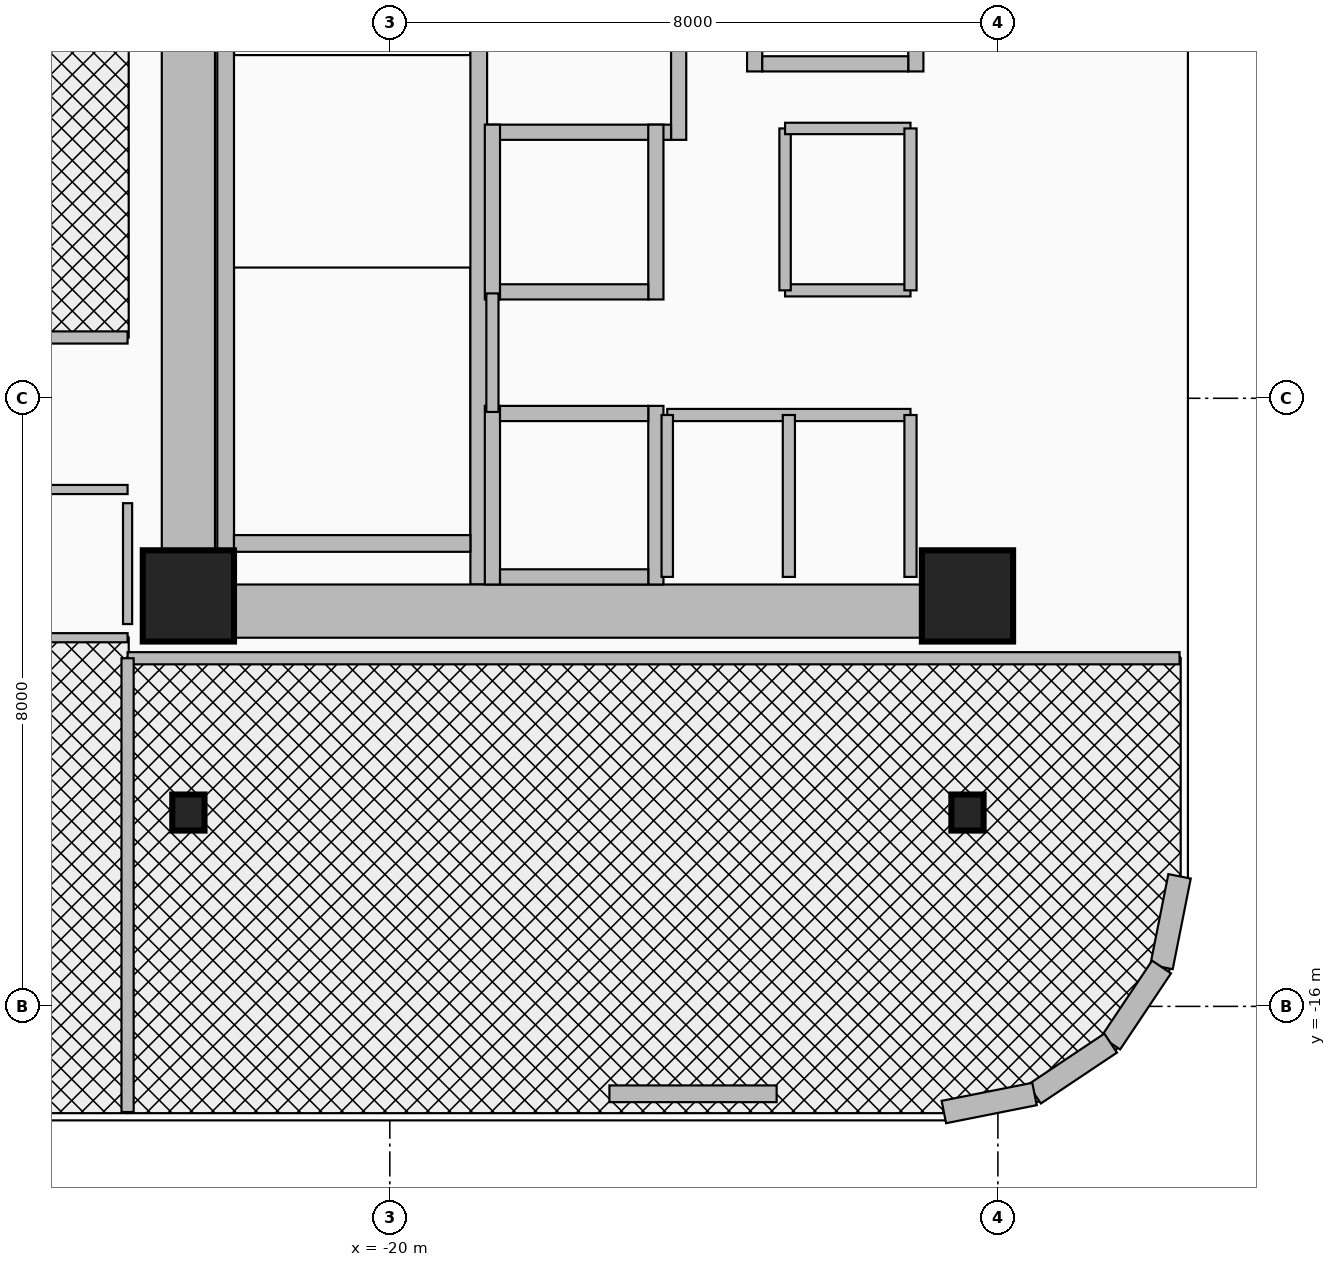
"""IFC4 building model, lengths in metres.
Left out: names, types, materials, properties, quantities, classifications, styles, units other than length and angle.
Written with IfcOpenShell. Run it as: python <this file> out.ifc"""

import sys

from ifc_helpers import new_model, si_unit, direction, frame, frame_2d, origin, origin_2d, place, context, subcontext, project, spatial, rectangle, i_section, extrude, source, transform, mapped, element, fill, save


model = new_model("IFC4")
c1 = context("Model", 3, precision=1e-05, world=origin(), true_north=direction((0.0, 1.0)))
c2 = subcontext(c1, "Body", "Model", "MODEL_VIEW")
j1 = project(units=[si_unit("LENGTHUNIT", "METRE"), si_unit("PLANEANGLEUNIT", "RADIAN")], contexts=[c1])
p1 = place(None, origin())
s1 = spatial("IfcSite", under=j1, at=p1, CompositionType="ELEMENT")
p2 = place(p1, origin())
s2 = spatial("IfcBuilding", under=s1, at=p2, CompositionType="ELEMENT")
p3 = place(p2, frame((0.0, 0.0, 109.4)))
s3 = spatial("IfcBuildingStorey", under=s2, at=p3, CompositionType="ELEMENT", Elevation=109.4)
for number, where, z_axis, x_axis in (
    (1, (-22.16, -10.45, 0.0), (0.0, 0.0, 1.0), (0.0, 1.0, 0.0)),
    (2, (-18.83, -10.45, 0.0), (0.0, 0.0, 1.0), (0.0, 1.0, 0.0)),
):
    element("IfcWall", number, at=place(p3, frame(where, z_axis=z_axis, x_axis=x_axis)), inside=s3, PredefinedType="SHEAR", context=c2, shape_type="SweptSolid", body=[
        extrude(rectangle(XDim=8.67, YDim=0.22, at=frame_2d((4.335, 0.0))), origin(), (0.0, 0.0, 1.0), 3.46),
    ])
p4 = place(p3, frame((-22.05, -9.91, 0.0), z_axis=(0.0, 0.0, 1.0), x_axis=(1.0, 0.0, 0.0)))
e3 = element("IfcWall", 3, at=p4, inside=s3, PredefinedType="SHEAR", context=c2, shape_type="SweptSolid", body=[
    extrude(rectangle(XDim=3.11, YDim=0.22, at=frame_2d((1.555, 0.0))), origin(), (0.0, 0.0, 1.0), 3.46),
])
p5 = place(p3, frame((-22.65, -11.15, 0.0), z_axis=(0.0, 0.0, 1.0), x_axis=(0.0, 1.0, 0.0)))
e4 = element("IfcWall", 4, at=p5, inside=s3, PredefinedType="SHEAR", context=c2, shape_type="SweptSolid", body=[
    extrude(rectangle(XDim=22.3, YDim=0.7, at=frame_2d((11.15, 0.0))), origin(), (0.0, 0.0, 1.0), 3.46),
])
p6 = place(p3, frame((-22.65, -10.8, 0.0), z_axis=(0.0, 0.0, 1.0), x_axis=(1.0, 0.0, 0.0)))
e5 = element("IfcWall", 5, at=p6, inside=s3, PredefinedType="SHEAR", context=c2, shape_type="SweptSolid", body=[
    extrude(rectangle(XDim=10.25, YDim=0.7, at=frame_2d((5.125, 0.0))), origin(), (0.0, 0.0, 1.0), 3.46),
])
m1 = source(origin(), c2, "Body", "SweptSolid", [
    extrude(rectangle(XDim=1.2, YDim=1.2, at=origin_2d()), origin(), (0.0, 0.0, 1.0), 3.7),
])
for number, where, z_axis, x_axis in (
    (6, (-22.65, -10.6, 0.0), (0.0, 0.0, 1.0), (1.0, 0.0, 0.0)),
    (7, (-12.4, -10.6, 0.0), (0.0, 0.0, 1.0), (1.0, 0.0, 0.0)),
):
    element("IfcColumn", number, at=place(p3, frame(where, z_axis=z_axis, x_axis=x_axis)), inside=s3, PredefinedType="COLUMN", context=c2, shape_type="MappedRepresentation", body=[
        mapped(m1, transform((0.0, 0.0, 0.0), x_axis=(1.0, 0.0, 0.0), y_axis=(0.0, 1.0, 0.0), z_axis=(0.0, 0.0, 1.0), scale=1.0)),
    ])
m2 = source(origin(), c2, "Body", "SweptSolid", [
    extrude(i_section(OverallWidth=0.424, OverallDepth=0.474, WebThickness=0.048, FlangeThickness=0.077, at=origin_2d()), origin(), (0.0, 0.0, 1.0), 3.7),
])
for number, where, z_axis, x_axis in (
    (8, (-22.65, -13.45, 0.0), (0.0, 0.0, 1.0), (1.0, 0.0, 0.0)),
    (9, (-12.4, -13.45, 0.0), (0.0, 0.0, 1.0), (1.0, 0.0, 0.0)),
):
    element("IfcColumn", number, at=place(p3, frame(where, z_axis=z_axis, x_axis=x_axis)), inside=s3, PredefinedType="COLUMN", context=c2, shape_type="MappedRepresentation", body=[
        mapped(m2, transform((0.0, 0.0, 0.0), x_axis=(1.0, 0.0, 0.0), y_axis=(0.0, 1.0, 0.0), z_axis=(0.0, 0.0, 1.0), scale=1.0)),
    ])
p7 = place(p3, frame((-9.61, -14.289, 0.0), z_axis=(0.0, 0.0, 1.0), x_axis=(-0.194996050505, -0.980804027463, 0.0)))
e10 = element("IfcWall", 10, at=p7, inside=s3, PredefinedType="SOLIDWALL", context=c2, shape_type="SweptSolid", body=[
    extrude(rectangle(XDim=1.216, YDim=0.3, at=frame_2d((0.608, 0.0))), origin(), (0.0, 0.0, 1.0), 3.46),
])
for number, where, z_axis, x_axis in (
    (11, (-9.847, -15.482, 0.0), (0.0, 0.0, 1.0), (-0.556, -0.831, 0.0)),
    (12, (-10.517, -16.483, 0.0), (0.0, 0.0, 1.0), (-0.831, -0.556, 0.0)),
):
    element("IfcWall", number, at=place(p3, frame(where, z_axis=z_axis, x_axis=x_axis)), inside=s3, PredefinedType="SOLIDWALL", context=c2, shape_type="SweptSolid", body=[
        extrude(rectangle(XDim=1.205, YDim=0.3, at=frame_2d((0.603, 0.0))), origin(), (0.0, 0.0, 1.0), 3.46),
    ])
p8 = place(p3, frame((-11.518, -17.153, 0.0), z_axis=(0.0, 0.0, 1.0), x_axis=(-0.980804027463, -0.194996050505, 0.0)))
e13 = element("IfcWall", 13, at=p8, inside=s3, PredefinedType="SOLIDWALL", context=c2, shape_type="SweptSolid", body=[
    extrude(rectangle(XDim=1.216, YDim=0.3, at=frame_2d((0.608, 0.0))), origin(), (0.0, 0.0, 1.0), 3.46),
])
p9 = place(p3, frame((-14.911, -17.15, 0.0), z_axis=(0.0, 0.0, 1.0), x_axis=(-1.0, 0.0, 0.0)))
e14 = element("IfcWall", 14, at=p9, inside=s3, PredefinedType="SOLIDWALL", context=c2, shape_type="SweptSolid", body=[
    extrude(rectangle(XDim=2.2, YDim=0.22, at=frame_2d((1.1, 0.0))), origin(), (0.0, 0.0, 1.0), 3.46),
])
p10 = place(p9, frame((0.65, 0.0, 0.95)))
e15 = element("IfcOpeningElement", 15, at=p10, cuts=e14, PredefinedType="OPENING", context=c2, shape_type="SweptSolid", body=[
    extrude(rectangle(XDim=0.9, YDim=1.3, at=frame_2d((0.45, 0.65))), frame((0.0, 0.125, 0.0), z_axis=(0.0, -1.0, 0.0), x_axis=(1.0, 0.0, 0.0)), (0.0, 0.0, 1.0), 0.25),
])
p11 = place(p3, frame((-16.2, -4.6, 0.0), z_axis=(0.0, 0.0, 1.0), x_axis=(0.0, 1.0, 0.0)))
e16 = element("IfcWall", 16, at=p11, inside=s3, PredefinedType="MOVABLE", context=c2, shape_type="SweptSolid", body=[
    extrude(rectangle(XDim=3.2, YDim=0.2, at=frame_2d((1.6, 0.0))), origin(), (0.0, 0.0, 1.0), 3.46),
])
p12 = place(p3, frame((-18.72, -4.5, 0.0), z_axis=(0.0, 0.0, 1.0), x_axis=(1.0, 0.0, 0.0)))
e17 = element("IfcWall", 17, at=p12, inside=s3, PredefinedType="MOVABLE", context=c2, shape_type="SweptSolid", body=[
    extrude(rectangle(XDim=2.42, YDim=0.2, at=frame_2d((1.21, 0.0))), origin(), (0.0, 0.0, 1.0), 3.46),
])
for number, where, z_axis, x_axis in (
    (18, (-18.65, -10.45, 0.0), (0.0, 0.0, 1.0), (0.0, 1.0, 0.0)),
    (19, (-16.5, -10.45, 0.0), (0.0, 0.0, 1.0), (0.0, 1.0, 0.0)),
):
    element("IfcWall", number, at=place(p3, frame(where, z_axis=z_axis, x_axis=x_axis)), inside=s3, PredefinedType="MOVABLE", context=c2, shape_type="SweptSolid", body=[
        extrude(rectangle(XDim=2.35, YDim=0.2, at=frame_2d((1.175, 0.0))), origin(), (0.0, 0.0, 1.0), 2.666),
    ])
p13 = place(p3, frame((-18.55, -10.35, 0.0), z_axis=(0.0, 0.0, 1.0), x_axis=(1.0, 0.0, 0.0)))
e20 = element("IfcWall", 20, at=p13, inside=s3, PredefinedType="MOVABLE", context=c2, shape_type="SweptSolid", body=[
    extrude(rectangle(XDim=1.95, YDim=0.2, at=frame_2d((0.975, 0.0))), origin(), (0.0, 0.0, 1.0), 2.666),
])
p14 = place(p3, frame((-18.55, -8.2, 0.0), z_axis=(0.0, 0.0, 1.0), x_axis=(1.0, 0.0, 0.0)))
e21 = element("IfcWall", 21, at=p14, inside=s3, PredefinedType="MOVABLE", context=c2, shape_type="SweptSolid", body=[
    extrude(rectangle(XDim=1.95, YDim=0.2, at=frame_2d((0.975, 0.0))), origin(), (0.0, 0.0, 1.0), 3.46),
])
p15 = place(p14, frame((0.425, 0.0, 0.0)))
e22 = element("IfcOpeningElement", 22, at=p15, cuts=e21, PredefinedType="OPENING", context=c2, shape_type="SweptSolid", body=[
    extrude(rectangle(XDim=1.1, YDim=2.1, at=frame_2d((0.55, 1.05))), frame((0.0, 0.115, 0.0), z_axis=(0.0, -1.0, 0.0), x_axis=(1.0, 0.0, 0.0)), (0.0, 0.0, 1.0), 0.23),
])
for number, where, z_axis, x_axis in (
    (23, (-18.65, -6.7, 0.0), (0.0, 0.0, 1.0), (0.0, 1.0, 0.0)),
    (24, (-16.5, -6.7, 0.0), (0.0, 0.0, 1.0), (0.0, 1.0, 0.0)),
):
    element("IfcWall", number, at=place(p3, frame(where, z_axis=z_axis, x_axis=x_axis)), inside=s3, PredefinedType="MOVABLE", context=c2, shape_type="SweptSolid", body=[
        extrude(rectangle(XDim=2.3, YDim=0.2, at=frame_2d((1.15, 0.0))), origin(), (0.0, 0.0, 1.0), 3.46),
    ])
p16 = place(p3, frame((-18.55, -6.6, 0.0), z_axis=(0.0, 0.0, 1.0), x_axis=(1.0, 0.0, 0.0)))
e25 = element("IfcWall", 25, at=p16, inside=s3, PredefinedType="MOVABLE", context=c2, shape_type="SweptSolid", body=[
    extrude(rectangle(XDim=1.95, YDim=0.2, at=frame_2d((0.975, 0.0))), origin(), (0.0, 0.0, 1.0), 3.46),
])
for number, where, z_axis, x_axis in (
    (26, (-15.2, -3.7, 0.0), (0.0, 0.0, 1.0), (0.0, 1.0, 0.0)),
    (27, (-13.08, -3.7, 0.0), (0.0, 0.0, 1.0), (0.0, 1.0, 0.0)),
):
    element("IfcWall", number, at=place(p3, frame(where, z_axis=z_axis, x_axis=x_axis)), inside=s3, PredefinedType="MOVABLE", context=c2, shape_type="SweptSolid", body=[
        extrude(rectangle(XDim=2.35, YDim=0.2, at=frame_2d((1.175, 0.0))), origin(), (0.0, 0.0, 1.0), 3.46),
    ])
p17 = place(p3, frame((-15.1, -3.6, 0.0), z_axis=(0.0, 0.0, 1.0), x_axis=(1.0, 0.0, 0.0)))
e28 = element("IfcWall", 28, at=p17, inside=s3, PredefinedType="MOVABLE", context=c2, shape_type="SweptSolid", body=[
    extrude(rectangle(XDim=1.92, YDim=0.2, at=frame_2d((0.96, 0.0))), origin(), (0.0, 0.0, 1.0), 3.46),
])
p18 = place(p3, frame((-18.65, -8.18, 0.0), z_axis=(0.0, 0.0, 1.0), x_axis=(0.0, 1.0, 0.0)))
e29 = element("IfcWall", 29, at=p18, inside=s3, PredefinedType="PARTITIONING", context=c2, shape_type="SweptSolid", body=[
    extrude(rectangle(XDim=1.56, YDim=0.16, at=frame_2d((0.78, 0.0))), origin(), (0.0, 0.0, 1.0), 3.46),
])
p19 = place(p3, frame((-16.35, -8.22, 0.0), z_axis=(0.0, 0.0, 1.0), x_axis=(1.0, 0.0, 0.0)))
e30 = element("IfcWall", 30, at=p19, inside=s3, PredefinedType="PARTITIONING", context=c2, shape_type="SweptSolid", body=[
    extrude(rectangle(XDim=3.2, YDim=0.16, at=frame_2d((1.6, 0.0))), origin(), (0.0, 0.0, 1.0), 3.46),
])
p20 = place(p19, frame((0.35, 0.0, 0.0)))
e31 = element("IfcOpeningElement", 31, at=p20, cuts=e30, PredefinedType="OPENING", context=c2, shape_type="SweptSolid", body=[
    extrude(rectangle(XDim=0.85, YDim=2.05, at=frame_2d((0.425, 1.025))), frame((0.0, 0.095, 0.0), z_axis=(0.0, -1.0, 0.0), x_axis=(1.0, 0.0, 0.0)), (0.0, 0.0, 1.0), 0.19),
])
p21 = place(p19, frame((1.95, 0.0, 0.0)))
e32 = element("IfcOpeningElement", 32, at=p21, cuts=e30, PredefinedType="OPENING", context=c2, shape_type="SweptSolid", body=[
    extrude(rectangle(XDim=0.85, YDim=2.05, at=frame_2d((0.425, 1.025))), frame((0.0, 0.095, 0.0), z_axis=(0.0, -1.0, 0.0), x_axis=(1.0, 0.0, 0.0)), (0.0, 0.0, 1.0), 0.19),
])
p22 = place(p3, frame((-16.35, -10.35, 0.0), z_axis=(0.0, 0.0, 1.0), x_axis=(0.0, 1.0, 0.0)))
e33 = element("IfcWall", 33, at=p22, inside=s3, PredefinedType="PARTITIONING", context=c2, shape_type="SweptSolid", body=[
    extrude(rectangle(XDim=2.13, YDim=0.15, at=frame_2d((1.065, 0.0))), origin(), (0.0, 0.0, 1.0), 3.46),
])
for number, where, z_axis, x_axis in (
    (34, (-13.15, -10.35, 0.0), (0.0, 0.0, 1.0), (0.0, 1.0, 0.0)),
    (35, (-14.75, -10.35, 0.0), (0.0, 0.0, 1.0), (0.0, 1.0, 0.0)),
):
    element("IfcWall", number, at=place(p3, frame(where, z_axis=z_axis, x_axis=x_axis)), inside=s3, PredefinedType="PARTITIONING", context=c2, shape_type="SweptSolid", body=[
        extrude(rectangle(XDim=2.13, YDim=0.16, at=frame_2d((1.065, 0.0))), origin(), (0.0, 0.0, 1.0), 3.46),
    ])
p23 = place(p3, frame((-14.8, -6.58, 0.0), z_axis=(0.0, 0.0, 1.0), x_axis=(1.0, 0.0, 0.0)))
e36 = element("IfcWall", 36, at=p23, inside=s3, PredefinedType="PARTITIONING", context=c2, shape_type="SweptSolid", body=[
    extrude(rectangle(XDim=1.65, YDim=0.16, at=frame_2d((0.825, 0.0))), origin(), (0.0, 0.0, 1.0), 3.46),
])
p24 = place(p23, frame((0.5, 0.0, 0.0)))
e37 = element("IfcOpeningElement", 37, at=p24, cuts=e36, PredefinedType="OPENING", context=c2, shape_type="SweptSolid", body=[
    extrude(rectangle(XDim=0.85, YDim=2.05, at=frame_2d((0.425, 1.025))), frame((0.0, 0.095, 0.0), z_axis=(0.0, -1.0, 0.0), x_axis=(1.0, 0.0, 0.0)), (0.0, 0.0, 1.0), 0.19),
])
p25 = place(p3, frame((-14.8, -6.58, 0.0), z_axis=(0.0, 0.0, 1.0), x_axis=(0.0, 1.0, 0.0)))
e38 = element("IfcWall", 38, at=p25, inside=s3, PredefinedType="PARTITIONING", context=c2, shape_type="SweptSolid", body=[
    extrude(rectangle(XDim=2.13, YDim=0.15, at=frame_2d((1.065, 0.0))), origin(), (0.0, 0.0, 1.0), 3.46),
])
p26 = place(p3, frame((-14.8, -4.45, 0.0), z_axis=(0.0, 0.0, 1.0), x_axis=(1.0, 0.0, 0.0)))
e39 = element("IfcWall", 39, at=p26, inside=s3, PredefinedType="PARTITIONING", context=c2, shape_type="SweptSolid", body=[
    extrude(rectangle(XDim=1.65, YDim=0.15, at=frame_2d((0.825, 0.0))), origin(), (0.0, 0.0, 1.0), 3.46),
])
p27 = place(p3, frame((-13.15, -6.58, 0.0), z_axis=(0.0, 0.0, 1.0), x_axis=(0.0, 1.0, 0.0)))
e40 = element("IfcWall", 40, at=p27, inside=s3, PredefinedType="PARTITIONING", context=c2, shape_type="SweptSolid", body=[
    extrude(rectangle(XDim=2.13, YDim=0.16, at=frame_2d((1.065, 0.0))), origin(), (0.0, 0.0, 1.0), 3.46),
])
p28 = place(p3, frame((-23.45, -11.42, 0.0), z_axis=(0.0, 0.0, 1.0), x_axis=(1.0, 0.0, 0.0)))
e41 = element("IfcWall", 41, at=p28, inside=s3, PredefinedType="PARTITIONING", context=c2, shape_type="SweptSolid", body=[
    extrude(rectangle(XDim=13.84, YDim=0.16, at=frame_2d((6.92, 0.0))), origin(), (0.0, 0.0, 1.0), 2.834),
])
p29 = place(p3, frame((-23.45, -17.39, 0.0), z_axis=(0.0, 0.0, 1.0), x_axis=(0.0, 1.0, 0.0)))
e42 = element("IfcWall", 42, at=p29, inside=s3, PredefinedType="PARTITIONING", context=c2, shape_type="SweptSolid", body=[
    extrude(rectangle(XDim=5.97, YDim=0.16, at=frame_2d((2.985, 0.0))), origin(), (0.0, 0.0, 1.0), 3.46),
])
p30 = place(p29, frame((2.535, 0.0, 0.0)))
e43 = element("IfcOpeningElement", 43, at=p30, cuts=e42, PredefinedType="OPENING", context=c2, shape_type="SweptSolid", body=[
    extrude(rectangle(XDim=0.9, YDim=2.1, at=frame_2d((0.45, 1.05))), frame((0.0, 0.095, 0.0), z_axis=(0.0, -1.0, 0.0), x_axis=(1.0, 0.0, 0.0)), (0.0, 0.0, 1.0), 0.19),
])
p31 = place(p3, frame((-30.89, -7.2, 0.0), z_axis=(0.0, 0.0, 1.0), x_axis=(1.0, 0.0, 0.0)))
e44 = element("IfcWall", 44, at=p31, inside=s3, PredefinedType="PARTITIONING", context=c2, shape_type="SweptSolid", body=[
    extrude(rectangle(XDim=7.44, YDim=0.16, at=frame_2d((3.72, 0.0))), origin(), (0.0, 0.0, 1.0), 2.896),
])
p32 = place(p31, frame((1.236, 0.0, 0.0)))
e45 = element("IfcOpeningElement", 45, at=p32, cuts=e44, PredefinedType="OPENING", context=c2, shape_type="SweptSolid", body=[
    extrude(rectangle(XDim=0.95, YDim=2.15, at=frame_2d((0.475, 1.075))), frame((0.0, 0.095, 0.0), z_axis=(0.0, -1.0, 0.0), x_axis=(1.0, 0.0, 0.0)), (0.0, 0.0, 1.0), 0.19),
])
p33 = place(p3, frame((-27.468, -9.2, 0.0), z_axis=(0.0, 0.0, 1.0), x_axis=(1.0, 0.0, 0.0)))
e46 = element("IfcWall", 46, at=p33, inside=s3, PredefinedType="PARTITIONING", context=c2, shape_type="SweptSolid", body=[
    extrude(rectangle(XDim=4.018, YDim=0.12, at=frame_2d((2.009, 0.0))), origin(), (0.0, 0.0, 1.0), 2.988),
])
p34 = place(p3, frame((-27.468, -11.15, 0.0), z_axis=(0.0, 0.0, 1.0), x_axis=(1.0, 0.0, 0.0)))
e47 = element("IfcWall", 47, at=p34, inside=s3, PredefinedType="PARTITIONING", context=c2, shape_type="SweptSolid", body=[
    extrude(rectangle(XDim=4.018, YDim=0.12, at=frame_2d((2.009, 0.0))), origin(), (0.0, 0.0, 1.0), 3.46),
])
p35 = place(p3, frame((-23.45, -10.97, 0.0), z_axis=(0.0, 0.0, 1.0), x_axis=(0.0, 1.0, 0.0)))
e48 = element("IfcWall", 48, at=p35, inside=s3, PredefinedType="PARTITIONING", context=c2, shape_type="SweptSolid", body=[
    extrude(rectangle(XDim=1.59, YDim=0.12, at=frame_2d((0.795, 0.0))), origin(), (0.0, 0.0, 1.0), 2.666),
])
p36 = place(p10, origin())
e49 = element("IfcWindow", 49, at=p36, inside=s3, PartitioningType="SINGLE_PANEL", PredefinedType="WINDOW", context=c2, shape_type="SweptSolid", body=[
    extrude(rectangle(XDim=0.9, YDim=1.3, at=frame_2d((0.45, 0.65))), frame((0.0, 0.03, 0.0), z_axis=(0.0, -1.0, 0.0), x_axis=(1.0, 0.0, 0.0)), (0.0, 0.0, 1.0), 0.06),
])
fill(e15, e49)
p37 = place(p15, origin())
e50 = element("IfcDoor", 50, at=p37, inside=s3, OperationType="DOUBLE_DOOR_SLIDING", PredefinedType="DOOR", context=c2, shape_type="SweptSolid", body=[
    extrude(rectangle(XDim=1.1, YDim=2.1, at=frame_2d((0.55, 1.05))), frame((0.0, 0.025, 0.0), z_axis=(0.0, -1.0, 0.0), x_axis=(1.0, 0.0, 0.0)), (0.0, 0.0, 1.0), 0.05),
])
fill(e22, e50)
p38 = place(p20, origin())
e51 = element("IfcDoor", 51, at=p38, inside=s3, OperationType="SINGLE_SWING_LEFT", PredefinedType="DOOR", context=c2, shape_type="SweptSolid", body=[
    extrude(rectangle(XDim=0.85, YDim=2.05, at=frame_2d((0.425, 1.025))), frame((0.0, 0.025, 0.0), z_axis=(0.0, -1.0, 0.0), x_axis=(1.0, 0.0, 0.0)), (0.0, 0.0, 1.0), 0.05),
])
fill(e31, e51)
p39 = place(p21, origin())
e52 = element("IfcDoor", 52, at=p39, inside=s3, OperationType="SINGLE_SWING_RIGHT", PredefinedType="DOOR", context=c2, shape_type="SweptSolid", body=[
    extrude(rectangle(XDim=0.85, YDim=2.05, at=frame_2d((0.425, 1.025))), frame((0.0, 0.025, 0.0), z_axis=(0.0, -1.0, 0.0), x_axis=(1.0, 0.0, 0.0)), (0.0, 0.0, 1.0), 0.05),
])
fill(e32, e52)
p40 = place(p24, origin())
e53 = element("IfcDoor", 53, at=p40, inside=s3, OperationType="SINGLE_SWING_LEFT", PredefinedType="DOOR", context=c2, shape_type="SweptSolid", body=[
    extrude(rectangle(XDim=0.85, YDim=2.05, at=frame_2d((0.425, 1.025))), frame((0.0, 0.025, 0.0), z_axis=(0.0, -1.0, 0.0), x_axis=(1.0, 0.0, 0.0)), (0.0, 0.0, 1.0), 0.05),
])
fill(e37, e53)
p41 = place(p30, origin())
e54 = element("IfcDoor", 54, at=p41, inside=s3, OperationType="SINGLE_SWING_RIGHT", PredefinedType="DOOR", context=c2, shape_type="SweptSolid", body=[
    extrude(rectangle(XDim=0.9, YDim=2.1, at=frame_2d((0.45, 1.05))), frame((0.0, 0.025, 0.0), z_axis=(0.0, -1.0, 0.0), x_axis=(1.0, 0.0, 0.0)), (0.0, 0.0, 1.0), 0.05),
])
fill(e43, e54)
save(model, sys.argv[1])
